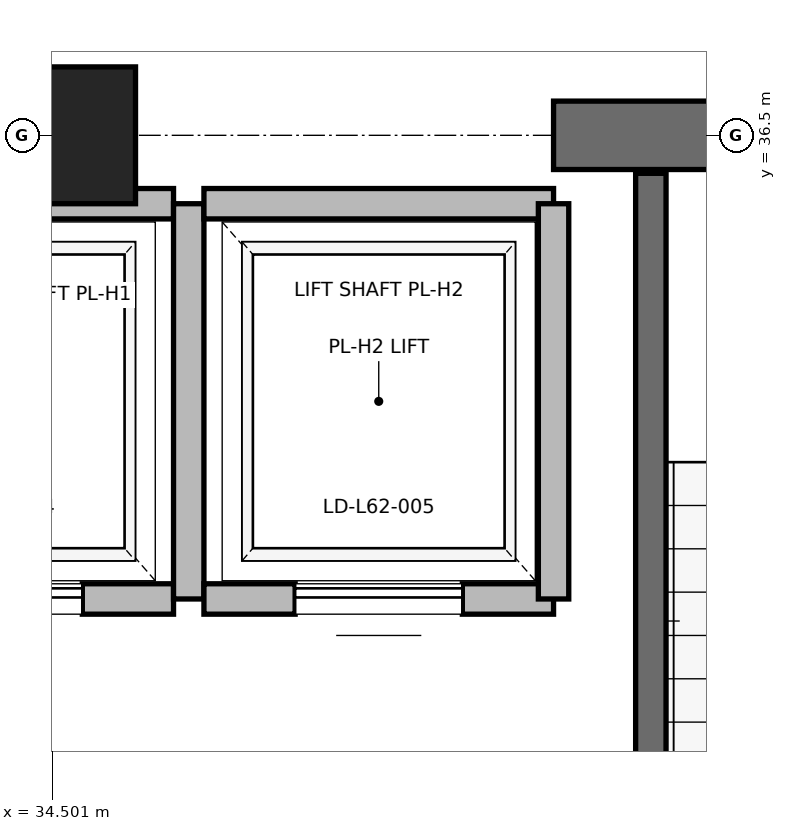
"""IFC4 building model, lengths in metres.
Left out: names, types, materials, properties, quantities, classifications, styles, units other than length and angle.
Written with IfcOpenShell. Run it as: python <this file> out.ifc"""

import sys

from ifc_helpers import new_model, si_unit, direction, frame, frame_2d, origin, origin_2d, place, context, subcontext, project, spatial, rectangle, extrude, element, fill, save


model = new_model("IFC4")
c1 = context("Model", 3, precision=1e-05, world=origin(), true_north=direction((0.0, 1.0)))
c2 = subcontext(c1, "Body", "Model", "MODEL_VIEW")
j1 = project(units=[si_unit("LENGTHUNIT", "METRE"), si_unit("PLANEANGLEUNIT", "RADIAN")], contexts=[c1])
p1 = place(None, origin())
s1 = spatial("IfcSite", under=j1, at=p1, CompositionType="ELEMENT")
p2 = place(p1, origin())
s2 = spatial("IfcBuilding", under=s1, at=p2, CompositionType="ELEMENT")
p3 = place(p2, frame((0.0, 0.0, 267.2)))
s3 = spatial("IfcBuildingStorey", under=s2, at=p3, CompositionType="ELEMENT", Elevation=267.2)
p4 = place(p3, frame((34.6, 36.5, 0.0), z_axis=(0.0, 0.0, 1.0), x_axis=(1.0, 0.0, 0.0)))
e1 = element("IfcColumn", 1, at=p4, inside=s3, PredefinedType="PILASTER", context=c2, shape_type="SweptSolid", body=[
    extrude(rectangle(XDim=0.9, YDim=0.9, at=origin_2d()), origin(), (0.0, 0.0, 1.0), 4.0),
])
p5 = place(p3, frame((29.0, 36.5, 0.0), z_axis=(0.0, 0.0, 1.0), x_axis=(1.0, 0.0, 0.0)))
e2 = element("IfcWall", 2, at=p5, inside=s3, PredefinedType="SHEAR", context=c2, shape_type="SweptSolid", body=[
    extrude(rectangle(XDim=5.8, YDim=0.45, at=frame_2d((2.9, 0.0))), origin(), (0.0, 0.0, 1.0), 3.785),
])
p6 = place(p3, frame((37.8, 36.5, 0.0), z_axis=(0.0, 0.0, 1.0), x_axis=(1.0, 0.0, 0.0)))
e3 = element("IfcWall", 3, at=p6, inside=s3, PredefinedType="SHEAR", context=c2, shape_type="SweptSolid", body=[
    extrude(rectangle(XDim=4.4, YDim=0.45, at=frame_2d((2.2, 0.0))), origin(), (0.0, 0.0, 1.0), 3.785),
])
p7 = place(p6, frame((1.65, 0.0, 0.0)))
e4 = element("IfcOpeningElement", 4, at=p7, cuts=e3, PredefinedType="OPENING", context=c2, shape_type="SweptSolid", body=[
    extrude(rectangle(XDim=1.1, YDim=2.15, at=frame_2d((0.55, 1.075))), frame((0.0, 0.225, 0.0), z_axis=(0.0, -1.0, 0.0), x_axis=(1.0, 0.0, 0.0)), (0.0, 0.0, 1.0), 0.45),
])
p8 = place(p3, frame((38.44, 27.38, 0.0), z_axis=(0.0, 0.0, 1.0), x_axis=(0.0, 1.0, 0.0)))
e5 = element("IfcWall", 5, at=p8, inside=s3, PredefinedType="SOLIDWALL", context=c2, shape_type="SweptSolid", body=[
    extrude(rectangle(XDim=8.87, YDim=0.2, at=frame_2d((4.435, 0.0))), origin(), (0.0, 0.0, 1.0), 3.785),
])
p9 = place(p3, frame((33.0, 33.45, 0.0), z_axis=(0.0, 0.0, 1.0), x_axis=(1.0, 0.0, 0.0)))
e6 = element("IfcWall", 6, at=p9, inside=s3, PredefinedType="SOLIDWALL", context=c2, shape_type="SweptSolid", body=[
    extrude(rectangle(XDim=2.3, YDim=0.2, at=frame_2d((1.15, 0.0))), origin(), (0.0, 0.0, 1.0), 3.785),
])
p10 = place(p9, frame((0.6, 0.0, 0.0)))
e7 = element("IfcOpeningElement", 7, at=p10, cuts=e6, PredefinedType="OPENING", context=c2, shape_type="SweptSolid", body=[
    extrude(rectangle(XDim=1.1, YDim=2.2, at=frame_2d((0.55, 1.1))), frame((0.0, 0.1, 0.0), z_axis=(0.0, -1.0, 0.0), x_axis=(1.0, 0.0, 0.0)), (0.0, 0.0, 1.0), 0.2),
])
p11 = place(p3, frame((35.3, 36.05, 0.0), z_axis=(0.0, 0.0, 1.0), x_axis=(-1.0, 0.0, 0.0)))
e8 = element("IfcWall", 8, at=p11, inside=s3, PredefinedType="SOLIDWALL", context=c2, shape_type="SweptSolid", body=[
    extrude(rectangle(XDim=2.3, YDim=0.2, at=frame_2d((1.15, 0.0))), origin(), (0.0, 0.0, 1.0), 2.865),
])
p12 = place(p3, frame((35.4, 33.45, 0.0), z_axis=(0.0, 0.0, 1.0), x_axis=(0.0, 1.0, 0.0)))
e9 = element("IfcWall", 9, at=p12, inside=s3, PredefinedType="SOLIDWALL", context=c2, shape_type="SweptSolid", body=[
    extrude(rectangle(XDim=2.6, YDim=0.2, at=frame_2d((1.3, 0.0))), origin(), (0.0, 0.0, 1.0), 2.865),
])
p13 = place(p3, frame((35.5, 33.45, 0.0), z_axis=(0.0, 0.0, 1.0), x_axis=(1.0, 0.0, 0.0)))
e10 = element("IfcWall", 10, at=p13, inside=s3, PredefinedType="SOLIDWALL", context=c2, shape_type="SweptSolid", body=[
    extrude(rectangle(XDim=2.3, YDim=0.2, at=frame_2d((1.15, 0.0))), origin(), (0.0, 0.0, 1.0), 3.785),
])
p14 = place(p13, frame((0.6, 0.0, 0.0)))
e11 = element("IfcOpeningElement", 11, at=p14, cuts=e10, PredefinedType="OPENING", context=c2, shape_type="SweptSolid", body=[
    extrude(rectangle(XDim=1.1, YDim=2.2, at=frame_2d((0.55, 1.1))), frame((0.0, 0.1, 0.0), z_axis=(0.0, -1.0, 0.0), x_axis=(1.0, 0.0, 0.0)), (0.0, 0.0, 1.0), 0.2),
])
p15 = place(p3, frame((37.8, 36.05, 0.0), z_axis=(0.0, 0.0, 1.0), x_axis=(-1.0, 0.0, 0.0)))
e12 = element("IfcWall", 12, at=p15, inside=s3, PredefinedType="SOLIDWALL", context=c2, shape_type="SweptSolid", body=[
    extrude(rectangle(XDim=2.3, YDim=0.2, at=frame_2d((1.15, 0.0))), origin(), (0.0, 0.0, 1.0), 2.865),
])
p16 = place(p3, frame((37.8, 33.45, 0.0), z_axis=(0.0, 0.0, 1.0), x_axis=(0.0, 1.0, 0.0)))
e13 = element("IfcWall", 13, at=p16, inside=s3, PredefinedType="SOLIDWALL", context=c2, shape_type="SweptSolid", body=[
    extrude(rectangle(XDim=2.6, YDim=0.2, at=frame_2d((1.3, 0.0))), origin(), (0.0, 0.0, 1.0), 2.865),
])
p17 = place(p10, origin())
e14 = element("IfcDoor", 14, at=p17, inside=s3, OperationType="SLIDING_TO_RIGHT", PredefinedType="DOOR", context=c2, shape_type="SweptSolid", body=[
    extrude(rectangle(XDim=1.1, YDim=2.2, at=frame_2d((0.55, 1.1))), frame((0.0, 0.025, 0.0), z_axis=(0.0, -1.0, 0.0), x_axis=(1.0, 0.0, 0.0)), (0.0, 0.0, 1.0), 0.05),
])
fill(e7, e14)
p18 = place(p14, origin())
e15 = element("IfcDoor", 15, at=p18, inside=s3, OperationType="SLIDING_TO_RIGHT", PredefinedType="DOOR", context=c2, shape_type="SweptSolid", body=[
    extrude(rectangle(XDim=1.1, YDim=2.2, at=frame_2d((0.55, 1.1))), frame((0.0, 0.025, 0.0), z_axis=(0.0, -1.0, 0.0), x_axis=(1.0, 0.0, 0.0)), (0.0, 0.0, 1.0), 0.05),
])
fill(e11, e15)
save(model, sys.argv[1])
